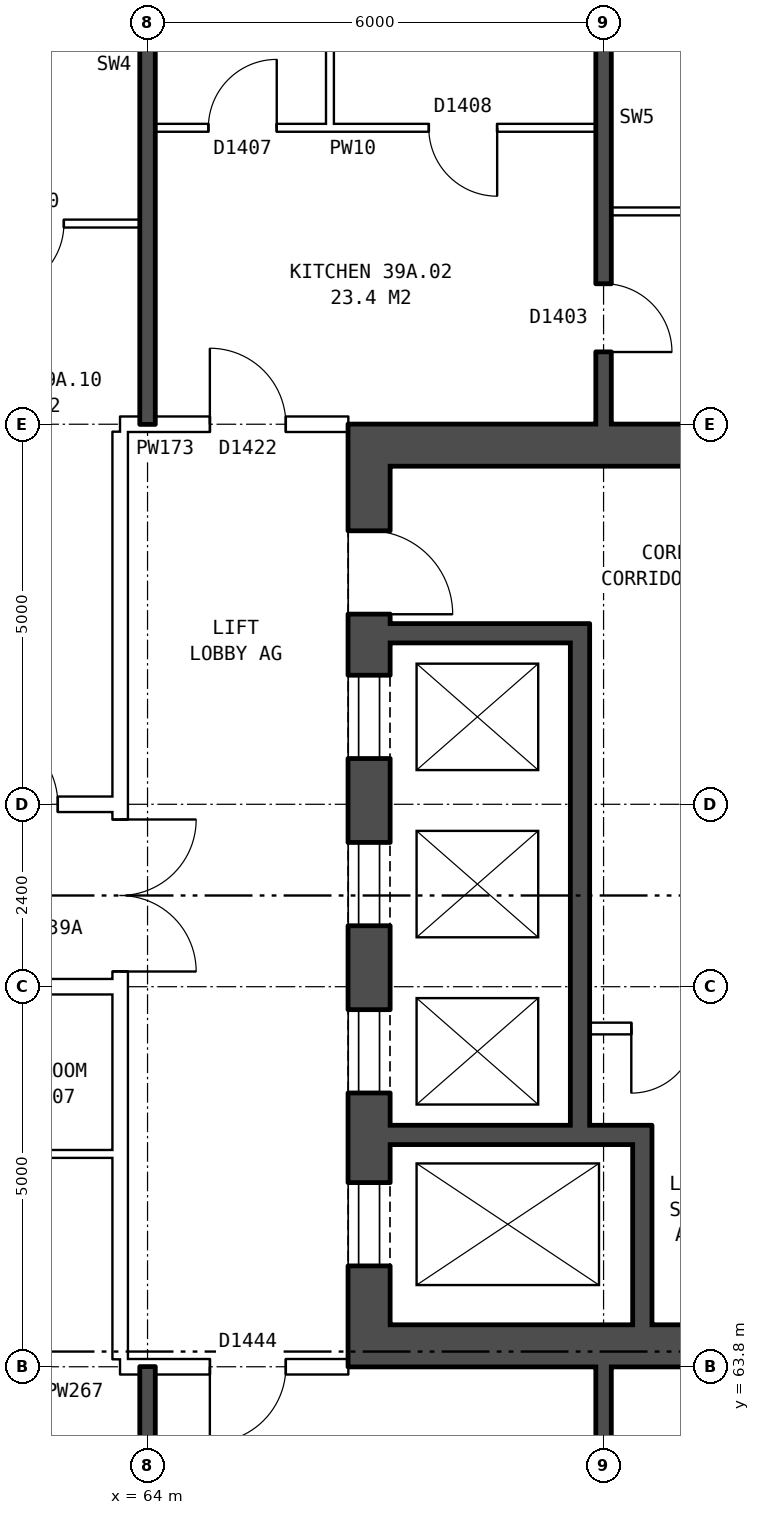
"""IFC4 building model, lengths in metres.
Left out: names, types, materials, properties, quantities, classifications, styles, units other than length and angle.
Written with IfcOpenShell. Run it as: python <this file> out.ifc"""

import sys

from ifc_helpers import new_model, si_unit, direction, frame, frame_2d, origin, place, context, subcontext, project, spatial, rectangle, extrude, element, fill, save


model = new_model("IFC4")
c1 = context("Model", 3, precision=1e-05, world=origin(), true_north=direction((0.0, 1.0)))
c2 = subcontext(c1, "Body", "Model", "MODEL_VIEW")
j1 = project(units=[si_unit("LENGTHUNIT", "METRE"), si_unit("PLANEANGLEUNIT", "RADIAN")], contexts=[c1])
p1 = place(None, origin())
s1 = spatial("IfcSite", under=j1, at=p1, CompositionType="ELEMENT")
p2 = place(p1, origin())
s2 = spatial("IfcBuilding", under=s1, at=p2, CompositionType="ELEMENT")
p3 = place(p2, frame((0.0, 0.0, 139.2)))
s3 = spatial("IfcBuildingStorey", under=s2, at=p3, CompositionType="ELEMENT", Elevation=139.2)
p4 = place(p3, frame((66.915, 63.8, 0.0), z_axis=(0.0, 0.0, 1.0), x_axis=(0.0, 1.0, 0.0)))
e1 = element("IfcWall", 1, at=p4, inside=s3, PredefinedType="SHEAR", context=c2, shape_type="SweptSolid", body=[
    extrude(rectangle(XDim=12.4, YDim=0.55, at=frame_2d((6.2, 0.0))), origin(), (0.0, 0.0, 1.0), 2.85),
])
p5 = place(p4, frame((1.325, 0.0, 0.0)))
e2 = element("IfcOpeningElement", 2, at=p5, cuts=e1, PredefinedType="OPENING", context=c2, shape_type="SweptSolid", body=[
    extrude(rectangle(XDim=1.1, YDim=2.1, at=frame_2d((0.55, 1.05))), frame((0.0, 0.285, 0.0), z_axis=(0.0, -1.0, 0.0), x_axis=(1.0, 0.0, 0.0)), (0.0, 0.0, 1.0), 0.57),
])
p6 = place(p4, frame((3.6, 0.0, 0.0)))
e3 = element("IfcOpeningElement", 3, at=p6, cuts=e1, PredefinedType="OPENING", context=c2, shape_type="SweptSolid", body=[
    extrude(rectangle(XDim=1.1, YDim=2.1, at=frame_2d((0.55, 1.05))), frame((0.0, 0.285, 0.0), z_axis=(0.0, -1.0, 0.0), x_axis=(1.0, 0.0, 0.0)), (0.0, 0.0, 1.0), 0.57),
])
p7 = place(p4, frame((5.8, 0.0, 0.0)))
e4 = element("IfcOpeningElement", 4, at=p7, cuts=e1, PredefinedType="OPENING", context=c2, shape_type="SweptSolid", body=[
    extrude(rectangle(XDim=1.1, YDim=2.1, at=frame_2d((0.55, 1.05))), frame((0.0, 0.285, 0.0), z_axis=(0.0, -1.0, 0.0), x_axis=(1.0, 0.0, 0.0)), (0.0, 0.0, 1.0), 0.57),
])
p8 = place(p4, frame((8.0, 0.0, 0.0)))
e5 = element("IfcOpeningElement", 5, at=p8, cuts=e1, PredefinedType="OPENING", context=c2, shape_type="SweptSolid", body=[
    extrude(rectangle(XDim=1.1, YDim=2.1, at=frame_2d((0.55, 1.05))), frame((0.0, 0.285, 0.0), z_axis=(0.0, -1.0, 0.0), x_axis=(1.0, 0.0, 0.0)), (0.0, 0.0, 1.0), 0.57),
])
p9 = place(p4, frame((9.9, 0.0, 0.0)))
e6 = element("IfcOpeningElement", 6, at=p9, cuts=e1, PredefinedType="OPENING", context=c2, shape_type="SweptSolid", body=[
    extrude(rectangle(XDim=1.1, YDim=2.1, at=frame_2d((0.55, 1.05))), frame((0.0, 0.285, 0.0), z_axis=(0.0, -1.0, 0.0), x_axis=(1.0, 0.0, 0.0)), (0.0, 0.0, 1.0), 0.57),
])
for number, where, z_axis, x_axis in (
    (7, (67.19, 64.075, 0.0), (0.0, 0.0, 1.0), (1.0, 0.0, 0.0)),
    (8, (67.19, 75.925, 0.0), (0.0, 0.0, 1.0), (1.0, 0.0, 0.0)),
):
    element("IfcWall", number, at=place(p3, frame(where, z_axis=z_axis, x_axis=x_axis)), inside=s3, PredefinedType="SHEAR", context=c2, shape_type="SweptSolid", body=[
        extrude(rectangle(XDim=7.9, YDim=0.55, at=frame_2d((3.95, 0.0))), origin(), (0.0, 0.0, 1.0), 2.85),
    ])
p10 = place(p3, frame((67.19, 66.85, 0.0), z_axis=(0.0, 0.0, 1.0), x_axis=(1.0, 0.0, 0.0)))
e9 = element("IfcWall", 9, at=p10, inside=s3, PredefinedType="SHEAR", context=c2, shape_type="SweptSolid", body=[
    extrude(rectangle(XDim=3.445, YDim=0.25, at=frame_2d((1.723, 0.0))), origin(), (0.0, 0.0, 1.0), 2.85),
])
p11 = place(p3, frame((69.815, 68.25, 0.0), z_axis=(0.0, 0.0, 1.0), x_axis=(1.0, 0.0, 0.0)))
e10 = element("IfcWall", 10, at=p11, inside=s3, PredefinedType="PARTITIONING", context=c2, shape_type="SweptSolid", body=[
    extrude(rectangle(XDim=1.95, YDim=0.15, at=frame_2d((0.975, 0.0))), origin(), (0.0, 0.0, 1.0), 2.85),
])
p12 = place(p11, frame((0.55, 0.0, 0.0)))
e11 = element("IfcOpeningElement", 11, at=p12, cuts=e10, PredefinedType="OPENING", context=c2, shape_type="SweptSolid", body=[
    extrude(rectangle(XDim=0.85, YDim=2.1, at=frame_2d((0.425, 1.05))), frame((0.0, 0.085, 0.0), z_axis=(0.0, -1.0, 0.0), x_axis=(1.0, 0.0, 0.0)), (0.0, 0.0, 1.0), 0.17),
])
p13 = place(p3, frame((67.19, 73.45, 0.0), z_axis=(0.0, 0.0, 1.0), x_axis=(1.0, 0.0, 0.0)))
e12 = element("IfcWall", 12, at=p13, inside=s3, PredefinedType="SHEAR", context=c2, shape_type="SweptSolid", body=[
    extrude(rectangle(XDim=2.375, YDim=0.25, at=frame_2d((1.188, 0.0))), origin(), (0.0, 0.0, 1.0), 2.85),
])
p14 = place(p3, frame((69.69, 66.975, 0.0), z_axis=(0.0, 0.0, 1.0), x_axis=(0.0, 1.0, 0.0)))
e13 = element("IfcWall", 13, at=p14, inside=s3, PredefinedType="SHEAR", context=c2, shape_type="SweptSolid", body=[
    extrude(rectangle(XDim=6.6, YDim=0.25, at=frame_2d((3.3, 0.0))), origin(), (0.0, 0.0, 1.0), 2.85),
])
p15 = place(p3, frame((70.51, 64.35, 0.0), z_axis=(0.0, 0.0, 1.0), x_axis=(0.0, 1.0, 0.0)))
e14 = element("IfcWall", 14, at=p15, inside=s3, PredefinedType="SHEAR", context=c2, shape_type="SweptSolid", body=[
    extrude(rectangle(XDim=2.375, YDim=0.25, at=frame_2d((1.188, 0.0))), origin(), (0.0, 0.0, 1.0), 2.85),
])
p16 = place(p3, frame((63.64, 63.9, 0.0), z_axis=(0.0, 0.0, 1.0), x_axis=(0.0, 1.0, 0.0)))
e15 = element("IfcWall", 15, at=p16, inside=s3, PredefinedType="PARTITIONING", context=c2, shape_type="SweptSolid", body=[
    extrude(rectangle(XDim=12.2, YDim=0.2, at=frame_2d((6.1, 0.0))), origin(), (0.0, 0.0, 1.0), 2.85),
])
p17 = place(p16, frame((5.1, 0.0, 0.0)))
e16 = element("IfcOpeningElement", 16, at=p17, cuts=e15, PredefinedType="OPENING", context=c2, shape_type="SweptSolid", body=[
    extrude(rectangle(XDim=2.0, YDim=2.1, at=frame_2d((1.0, 1.05))), frame((0.0, 0.11, 0.0), z_axis=(0.0, -1.0, 0.0), x_axis=(1.0, 0.0, 0.0)), (0.0, 0.0, 1.0), 0.22),
])
p18 = place(p3, frame((63.64, 63.8, 0.0), z_axis=(0.0, 0.0, 1.0), x_axis=(1.0, 0.0, 0.0)))
e17 = element("IfcWall", 17, at=p18, inside=s3, PredefinedType="PARTITIONING", context=c2, shape_type="SweptSolid", body=[
    extrude(rectangle(XDim=3.0, YDim=0.2, at=frame_2d((1.5, 0.0))), origin(), (0.0, 0.0, 1.0), 2.85),
])
p19 = place(p18, frame((1.18, 0.0, 0.0)))
e18 = element("IfcOpeningElement", 18, at=p19, cuts=e17, PredefinedType="OPENING", context=c2, shape_type="SweptSolid", body=[
    extrude(rectangle(XDim=1.0, YDim=2.1, at=frame_2d((0.5, 1.05))), frame((0.0, 0.11, 0.0), z_axis=(0.0, -1.0, 0.0), x_axis=(1.0, 0.0, 0.0)), (0.0, 0.0, 1.0), 0.22),
])
p20 = place(p3, frame((61.0, 66.6, 0.0), z_axis=(0.0, 0.0, 1.0), x_axis=(1.0, 0.0, 0.0)))
e19 = element("IfcWall", 19, at=p20, inside=s3, PredefinedType="PARTITIONING", context=c2, shape_type="SweptSolid", body=[
    extrude(rectangle(XDim=2.64, YDim=0.1, at=frame_2d((1.32, 0.0))), origin(), (0.0, 0.0, 1.0), 2.85),
])
p21 = place(p3, frame((44.36, 68.8, 0.0), z_axis=(0.0, 0.0, 1.0), x_axis=(1.0, 0.0, 0.0)))
e20 = element("IfcWall", 20, at=p21, inside=s3, PredefinedType="PARTITIONING", context=c2, shape_type="SweptSolid", body=[
    extrude(rectangle(XDim=19.28, YDim=0.2, at=frame_2d((9.64, 0.0))), origin(), (0.0, 0.0, 1.0), 2.85),
])
p22 = place(p21, frame((14.64, 0.0, 0.0)))
e21 = element("IfcOpeningElement", 21, at=p22, cuts=e20, PredefinedType="OPENING", context=c2, shape_type="SweptSolid", body=[
    extrude(rectangle(XDim=1.0, YDim=2.1, at=frame_2d((0.5, 1.05))), frame((0.0, 0.11, 0.0), z_axis=(0.0, -1.0, 0.0), x_axis=(1.0, 0.0, 0.0)), (0.0, 0.0, 1.0), 0.22),
])
p23 = place(p21, frame((8.64, 0.0, 0.0)))
e22 = element("IfcOpeningElement", 22, at=p23, cuts=e20, PredefinedType="OPENING", context=c2, shape_type="SweptSolid", body=[
    extrude(rectangle(XDim=1.0, YDim=2.1, at=frame_2d((0.5, 1.05))), frame((0.0, 0.11, 0.0), z_axis=(0.0, -1.0, 0.0), x_axis=(1.0, 0.0, 0.0)), (0.0, 0.0, 1.0), 0.22),
])
p24 = place(p21, frame((2.64, 0.0, 0.0)))
e23 = element("IfcOpeningElement", 23, at=p24, cuts=e20, PredefinedType="OPENING", context=c2, shape_type="SweptSolid", body=[
    extrude(rectangle(XDim=1.0, YDim=2.1, at=frame_2d((0.5, 1.05))), frame((0.0, 0.11, 0.0), z_axis=(0.0, -1.0, 0.0), x_axis=(1.0, 0.0, 0.0)), (0.0, 0.0, 1.0), 0.22),
])
p25 = place(p3, frame((44.36, 71.2, 0.0), z_axis=(0.0, 0.0, 1.0), x_axis=(1.0, 0.0, 0.0)))
e24 = element("IfcWall", 24, at=p25, inside=s3, PredefinedType="PARTITIONING", context=c2, shape_type="SweptSolid", body=[
    extrude(rectangle(XDim=19.28, YDim=0.2, at=frame_2d((9.64, 0.0))), origin(), (0.0, 0.0, 1.0), 2.85),
])
p26 = place(p25, frame((17.46, 0.0, 0.0)))
e25 = element("IfcOpeningElement", 25, at=p26, cuts=e24, PredefinedType="OPENING", context=c2, shape_type="SweptSolid", body=[
    extrude(rectangle(XDim=1.0, YDim=2.1, at=frame_2d((0.5, 1.05))), frame((0.0, 0.11, 0.0), z_axis=(0.0, -1.0, 0.0), x_axis=(1.0, 0.0, 0.0)), (0.0, 0.0, 1.0), 0.22),
])
p27 = place(p25, frame((8.64, 0.0, 0.0)))
e26 = element("IfcOpeningElement", 26, at=p27, cuts=e24, PredefinedType="OPENING", context=c2, shape_type="SweptSolid", body=[
    extrude(rectangle(XDim=1.0, YDim=2.1, at=frame_2d((0.5, 1.05))), frame((0.0, 0.11, 0.0), z_axis=(0.0, -1.0, 0.0), x_axis=(1.0, 0.0, 0.0)), (0.0, 0.0, 1.0), 0.22),
])
p28 = place(p25, frame((2.64, 0.0, 0.0)))
e27 = element("IfcOpeningElement", 27, at=p28, cuts=e24, PredefinedType="OPENING", context=c2, shape_type="SweptSolid", body=[
    extrude(rectangle(XDim=1.0, YDim=2.1, at=frame_2d((0.5, 1.05))), frame((0.0, 0.11, 0.0), z_axis=(0.0, -1.0, 0.0), x_axis=(1.0, 0.0, 0.0)), (0.0, 0.0, 1.0), 0.22),
])
p29 = place(p3, frame((63.64, 76.2, 0.0), z_axis=(0.0, 0.0, 1.0), x_axis=(1.0, 0.0, 0.0)))
e28 = element("IfcWall", 28, at=p29, inside=s3, PredefinedType="PARTITIONING", context=c2, shape_type="SweptSolid", body=[
    extrude(rectangle(XDim=3.0, YDim=0.2, at=frame_2d((1.5, 0.0))), origin(), (0.0, 0.0, 1.0), 2.85),
])
p30 = place(p29, frame((1.18, 0.0, 0.0)))
e29 = element("IfcOpeningElement", 29, at=p30, cuts=e28, PredefinedType="OPENING", context=c2, shape_type="SweptSolid", body=[
    extrude(rectangle(XDim=1.0, YDim=2.1, at=frame_2d((0.5, 1.05))), frame((0.0, 0.11, 0.0), z_axis=(0.0, -1.0, 0.0), x_axis=(1.0, 0.0, 0.0)), (0.0, 0.0, 1.0), 0.22),
])
p31 = place(p3, frame((61.0, 78.84, 0.0), z_axis=(0.0, 0.0, 1.0), x_axis=(1.0, 0.0, 0.0)))
e30 = element("IfcWall", 30, at=p31, inside=s3, PredefinedType="PARTITIONING", context=c2, shape_type="SweptSolid", body=[
    extrude(rectangle(XDim=2.9, YDim=0.1, at=frame_2d((1.45, 0.0))), origin(), (0.0, 0.0, 1.0), 2.85),
])
p32 = place(p31, frame((1.0, 0.0, 0.0)))
e31 = element("IfcOpeningElement", 31, at=p32, cuts=e30, PredefinedType="OPENING", context=c2, shape_type="SweptSolid", body=[
    extrude(rectangle(XDim=0.9, YDim=2.1, at=frame_2d((0.45, 1.05))), frame((0.0, 0.06, 0.0), z_axis=(0.0, -1.0, 0.0), x_axis=(1.0, 0.0, 0.0)), (0.0, 0.0, 1.0), 0.12),
])
p33 = place(p3, frame((70.1, 79.0, 0.0), z_axis=(0.0, 0.0, 1.0), x_axis=(1.0, 0.0, 0.0)))
e32 = element("IfcWall", 32, at=p33, inside=s3, PredefinedType="PARTITIONING", context=c2, shape_type="SweptSolid", body=[
    extrude(rectangle(XDim=5.54, YDim=0.1, at=frame_2d((2.77, 0.0))), origin(), (0.0, 0.0, 1.0), 2.85),
])
p34 = place(p3, frame((64.1, 80.1, 0.0), z_axis=(0.0, 0.0, 1.0), x_axis=(1.0, 0.0, 0.0)))
e33 = element("IfcWall", 33, at=p34, inside=s3, PredefinedType="PARTITIONING", context=c2, shape_type="SweptSolid", body=[
    extrude(rectangle(XDim=5.8, YDim=0.1, at=frame_2d((2.9, 0.0))), origin(), (0.0, 0.0, 1.0), 2.85),
])
p35 = place(p34, frame((3.6, 0.0, 0.0)))
e34 = element("IfcOpeningElement", 34, at=p35, cuts=e33, PredefinedType="OPENING", context=c2, shape_type="SweptSolid", body=[
    extrude(rectangle(XDim=0.9, YDim=2.1, at=frame_2d((0.45, 1.05))), frame((0.0, 0.06, 0.0), z_axis=(0.0, -1.0, 0.0), x_axis=(1.0, 0.0, 0.0)), (0.0, 0.0, 1.0), 0.12),
])
p36 = place(p34, frame((0.7, 0.0, 0.0)))
e35 = element("IfcOpeningElement", 35, at=p36, cuts=e33, PredefinedType="OPENING", context=c2, shape_type="SweptSolid", body=[
    extrude(rectangle(XDim=0.9, YDim=2.1, at=frame_2d((0.45, 1.05))), frame((0.0, 0.06, 0.0), z_axis=(0.0, -1.0, 0.0), x_axis=(1.0, 0.0, 0.0)), (0.0, 0.0, 1.0), 0.12),
])
for number, where, z_axis, x_axis in (
    (36, (64.0, 54.36, 0.0), (0.0, 0.0, 1.0), (0.0, 1.0, 0.0)),
    (37, (64.0, 76.2, 0.0), (0.0, 0.0, 1.0), (0.0, 1.0, 0.0)),
):
    element("IfcWall", number, at=place(p3, frame(where, z_axis=z_axis, x_axis=x_axis)), inside=s3, PredefinedType="SOLIDWALL", context=c2, shape_type="SweptSolid", body=[
        extrude(rectangle(XDim=9.44, YDim=0.2, at=frame_2d((4.72, 0.0))), origin(), (0.0, 0.0, 1.0), 2.85),
    ])
p37 = place(p3, frame((66.4, 80.15, 0.0), z_axis=(0.0, 0.0, 1.0), x_axis=(0.0, 1.0, 0.0)))
e38 = element("IfcWall", 38, at=p37, inside=s3, PredefinedType="PARTITIONING", context=c2, shape_type="SweptSolid", body=[
    extrude(rectangle(XDim=2.4, YDim=0.1, at=frame_2d((1.2, 0.0))), origin(), (0.0, 0.0, 1.0), 2.85),
])
p38 = place(p3, frame((70.0, 54.36, 0.0), z_axis=(0.0, 0.0, 1.0), x_axis=(0.0, 1.0, 0.0)))
e39 = element("IfcWall", 39, at=p38, inside=s3, PredefinedType="SOLIDWALL", context=c2, shape_type="SweptSolid", body=[
    extrude(rectangle(XDim=9.44, YDim=0.2, at=frame_2d((4.72, 0.0))), origin(), (0.0, 0.0, 1.0), 2.85),
])
p39 = place(p38, frame((7.04, 0.0, 0.0)))
e40 = element("IfcOpeningElement", 40, at=p39, cuts=e39, PredefinedType="OPENING", context=c2, shape_type="SweptSolid", body=[
    extrude(rectangle(XDim=0.9, YDim=2.1, at=frame_2d((0.45, 1.05))), frame((0.0, 0.11, 0.0), z_axis=(0.0, -1.0, 0.0), x_axis=(1.0, 0.0, 0.0)), (0.0, 0.0, 1.0), 0.22),
])
p40 = place(p3, frame((70.0, 76.2, 0.0), z_axis=(0.0, 0.0, 1.0), x_axis=(0.0, 1.0, 0.0)))
e41 = element("IfcWall", 41, at=p40, inside=s3, PredefinedType="SOLIDWALL", context=c2, shape_type="SweptSolid", body=[
    extrude(rectangle(XDim=9.44, YDim=0.2, at=frame_2d((4.72, 0.0))), origin(), (0.0, 0.0, 1.0), 2.85),
])
p41 = place(p40, frame((6.22, 0.0, 0.0)))
e42 = element("IfcOpeningElement", 42, at=p41, cuts=e41, PredefinedType="OPENING", context=c2, shape_type="SweptSolid", body=[
    extrude(rectangle(XDim=0.9, YDim=2.1, at=frame_2d((0.45, 1.05))), frame((0.0, 0.11, 0.0), z_axis=(0.0, -1.0, 0.0), x_axis=(1.0, 0.0, 0.0)), (0.0, 0.0, 1.0), 0.22),
])
p42 = place(p40, frame((0.95, 0.0, 0.0)))
e43 = element("IfcOpeningElement", 43, at=p42, cuts=e41, PredefinedType="OPENING", context=c2, shape_type="SweptSolid", body=[
    extrude(rectangle(XDim=0.9, YDim=2.1, at=frame_2d((0.45, 1.05))), frame((0.0, 0.11, 0.0), z_axis=(0.0, -1.0, 0.0), x_axis=(1.0, 0.0, 0.0)), (0.0, 0.0, 1.0), 0.22),
])
p43 = place(p5, origin())
e44 = element("IfcDoor", 44, at=p43, inside=s3, OperationType="DOUBLE_DOOR_SLIDING", PredefinedType="DOOR", context=c2, shape_type="SweptSolid", body=[
    extrude(rectangle(XDim=1.1, YDim=2.1, at=frame_2d((0.55, 1.05))), frame((0.0, -0.21, 0.0), z_axis=(0.0, -1.0, 0.0), x_axis=(1.0, 0.0, 0.0)), (0.0, 0.0, 1.0), 0.05),
])
fill(e2, e44)
p44 = place(p6, origin())
e45 = element("IfcDoor", 45, at=p44, inside=s3, OperationType="DOUBLE_DOOR_SLIDING", PredefinedType="DOOR", context=c2, shape_type="SweptSolid", body=[
    extrude(rectangle(XDim=1.1, YDim=2.1, at=frame_2d((0.55, 1.05))), frame((0.0, -0.21, 0.0), z_axis=(0.0, -1.0, 0.0), x_axis=(1.0, 0.0, 0.0)), (0.0, 0.0, 1.0), 0.05),
])
fill(e3, e45)
p45 = place(p7, origin())
e46 = element("IfcDoor", 46, at=p45, inside=s3, OperationType="DOUBLE_DOOR_SLIDING", PredefinedType="DOOR", context=c2, shape_type="SweptSolid", body=[
    extrude(rectangle(XDim=1.1, YDim=2.1, at=frame_2d((0.55, 1.05))), frame((0.0, -0.21, 0.0), z_axis=(0.0, -1.0, 0.0), x_axis=(1.0, 0.0, 0.0)), (0.0, 0.0, 1.0), 0.05),
])
fill(e4, e46)
p46 = place(p8, origin())
e47 = element("IfcDoor", 47, at=p46, inside=s3, OperationType="DOUBLE_DOOR_SLIDING", PredefinedType="DOOR", context=c2, shape_type="SweptSolid", body=[
    extrude(rectangle(XDim=1.1, YDim=2.1, at=frame_2d((0.55, 1.05))), frame((0.0, -0.21, 0.0), z_axis=(0.0, -1.0, 0.0), x_axis=(1.0, 0.0, 0.0)), (0.0, 0.0, 1.0), 0.05),
])
fill(e5, e47)
p47 = place(p9, frame((1.1, 0.0, 0.0), z_axis=(0.0, 0.0, 1.0), x_axis=(-1.0, 0.0, 0.0)))
e48 = element("IfcDoor", 48, at=p47, inside=s3, OperationType="SINGLE_SWING_RIGHT", PredefinedType="DOOR", context=c2, shape_type="SweptSolid", body=[
    extrude(rectangle(XDim=1.1, YDim=2.1, at=frame_2d((0.55, 1.05))), frame((0.0, 0.26, 0.0), z_axis=(0.0, -1.0, 0.0), x_axis=(1.0, 0.0, 0.0)), (0.0, 0.0, 1.0), 0.05),
])
fill(e6, e48)
p48 = place(p12, frame((0.85, 0.0, 0.0), z_axis=(0.0, 0.0, 1.0), x_axis=(-1.0, 0.0, 0.0)))
e49 = element("IfcDoor", 49, at=p48, inside=s3, OperationType="SINGLE_SWING_RIGHT", PredefinedType="DOOR", context=c2, shape_type="SweptSolid", body=[
    extrude(rectangle(XDim=0.85, YDim=2.1, at=frame_2d((0.425, 1.05))), frame((0.0, 0.025, 0.0), z_axis=(0.0, -1.0, 0.0), x_axis=(1.0, 0.0, 0.0)), (0.0, 0.0, 1.0), 0.05),
])
fill(e11, e49)
p49 = place(p17, frame((2.0, 0.0, 0.0), z_axis=(0.0, 0.0, 1.0), x_axis=(-1.0, 0.0, 0.0)))
e50 = element("IfcDoor", 50, at=p49, inside=s3, OperationType="DOUBLE_DOOR_SINGLE_SWING", PredefinedType="DOOR", context=c2, shape_type="SweptSolid", body=[
    extrude(rectangle(XDim=2.0, YDim=2.1, at=frame_2d((1.0, 1.05))), frame((0.0, 0.025, 0.0), z_axis=(0.0, -1.0, 0.0), x_axis=(1.0, 0.0, 0.0)), (0.0, 0.0, 1.0), 0.05),
])
fill(e16, e50)
p50 = place(p19, frame((1.0, 0.0, 0.0), z_axis=(0.0, 0.0, 1.0), x_axis=(-1.0, 0.0, 0.0)))
e51 = element("IfcDoor", 51, at=p50, inside=s3, OperationType="SINGLE_SWING_RIGHT", PredefinedType="DOOR", context=c2, shape_type="SweptSolid", body=[
    extrude(rectangle(XDim=1.0, YDim=2.1, at=frame_2d((0.5, 1.05))), frame((0.0, 0.025, 0.0), z_axis=(0.0, -1.0, 0.0), x_axis=(1.0, 0.0, 0.0)), (0.0, 0.0, 1.0), 0.05),
])
fill(e18, e51)
p51 = place(p42, frame((0.9, 0.0, 0.0), z_axis=(0.0, 0.0, 1.0), x_axis=(-1.0, 0.0, 0.0)))
e52 = element("IfcDoor", 52, at=p51, inside=s3, OperationType="SINGLE_SWING_RIGHT", PredefinedType="DOOR", context=c2, shape_type="SweptSolid", body=[
    extrude(rectangle(XDim=0.9, YDim=2.1, at=frame_2d((0.45, 1.05))), frame((0.0, 0.025, 0.0), z_axis=(0.0, -1.0, 0.0), x_axis=(1.0, 0.0, 0.0)), (0.0, 0.0, 1.0), 0.05),
])
fill(e43, e52)
p52 = place(p30, origin())
e53 = element("IfcDoor", 53, at=p52, inside=s3, OperationType="SINGLE_SWING_LEFT", PredefinedType="DOOR", context=c2, shape_type="SweptSolid", body=[
    extrude(rectangle(XDim=1.0, YDim=2.1, at=frame_2d((0.5, 1.05))), frame((0.0, 0.025, 0.0), z_axis=(0.0, -1.0, 0.0), x_axis=(1.0, 0.0, 0.0)), (0.0, 0.0, 1.0), 0.05),
])
fill(e29, e53)
p53 = place(p35, frame((0.9, 0.0, 0.0), z_axis=(0.0, 0.0, 1.0), x_axis=(-1.0, 0.0, 0.0)))
e54 = element("IfcDoor", 54, at=p53, inside=s3, OperationType="SINGLE_SWING_LEFT", PredefinedType="DOOR", context=c2, shape_type="SweptSolid", body=[
    extrude(rectangle(XDim=0.9, YDim=2.1, at=frame_2d((0.45, 1.05))), frame((0.0, 0.025, 0.0), z_axis=(0.0, -1.0, 0.0), x_axis=(1.0, 0.0, 0.0)), (0.0, 0.0, 1.0), 0.05),
])
fill(e34, e54)
p54 = place(p36, origin())
e55 = element("IfcDoor", 55, at=p54, inside=s3, OperationType="SINGLE_SWING_RIGHT", PredefinedType="DOOR", context=c2, shape_type="SweptSolid", body=[
    extrude(rectangle(XDim=0.9, YDim=2.1, at=frame_2d((0.45, 1.05))), frame((0.0, 0.025, 0.0), z_axis=(0.0, -1.0, 0.0), x_axis=(1.0, 0.0, 0.0)), (0.0, 0.0, 1.0), 0.05),
])
fill(e35, e55)
p55 = place(p26, origin())
e56 = element("IfcDoor", 56, at=p55, inside=s3, OperationType="SINGLE_SWING_LEFT", PredefinedType="DOOR", context=c2, shape_type="SweptSolid", body=[
    extrude(rectangle(XDim=1.0, YDim=2.1, at=frame_2d((0.5, 1.05))), frame((0.0, 0.025, 0.0), z_axis=(0.0, -1.0, 0.0), x_axis=(1.0, 0.0, 0.0)), (0.0, 0.0, 1.0), 0.05),
])
fill(e25, e56)
p56 = place(p32, frame((0.9, 0.0, 0.0), z_axis=(0.0, 0.0, 1.0), x_axis=(-1.0, 0.0, 0.0)))
e57 = element("IfcDoor", 57, at=p56, inside=s3, OperationType="SINGLE_SWING_RIGHT", PredefinedType="DOOR", context=c2, shape_type="SweptSolid", body=[
    extrude(rectangle(XDim=0.9, YDim=2.1, at=frame_2d((0.45, 1.05))), frame((0.0, 0.025, 0.0), z_axis=(0.0, -1.0, 0.0), x_axis=(1.0, 0.0, 0.0)), (0.0, 0.0, 1.0), 0.05),
])
fill(e31, e57)
save(model, sys.argv[1])
